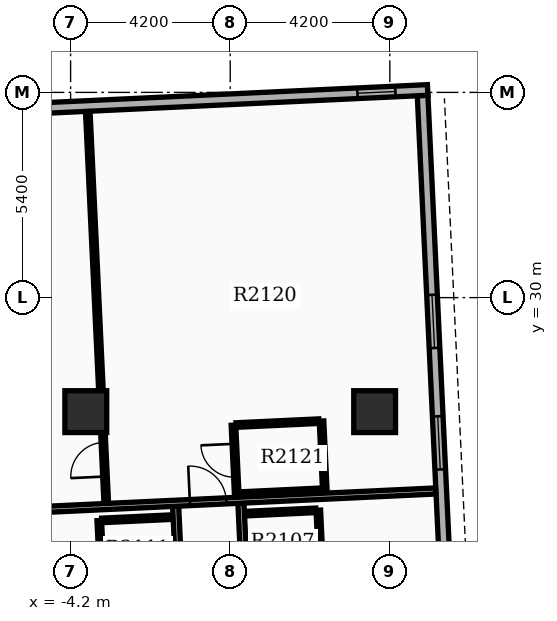
"""IFC4 building model, lengths in metres.
Left out: names, types, materials, properties, quantities, classifications, styles, units other than length and angle.
Written with IfcOpenShell. Run it as: python <this file> out.ifc"""

import sys

from ifc_helpers import new_model, si_unit, direction, frame, frame_2d, origin, origin_2d, place, context, subcontext, project, spatial, rectangle, extrude, element, fill, save


model = new_model("IFC4")
c1 = context("Model", 3, precision=1e-05, world=origin(), true_north=direction((0.0, 1.0)))
c2 = subcontext(c1, "Body", "Model", "MODEL_VIEW")
j1 = project(units=[si_unit("LENGTHUNIT", "METRE"), si_unit("PLANEANGLEUNIT", "RADIAN")], contexts=[c1])
p1 = place(None, origin())
s1 = spatial("IfcSite", under=j1, at=p1, CompositionType="ELEMENT")
p2 = place(p1, origin())
s2 = spatial("IfcBuilding", under=s1, at=p2, CompositionType="ELEMENT")
p3 = place(p2, frame((0.0, 0.0, 132.0)))
s3 = spatial("IfcBuildingStorey", under=s2, at=p3, CompositionType="ELEMENT", Elevation=132.0)
for number, where, z_axis, x_axis in (
    (1, (-3.8, 27.0, 0.0), (0.0, 0.0, 1.0), (1.0, 0.0, 0.0)),
    (2, (3.8, 27.0, 0.0), (0.0, 0.0, 1.0), (1.0, 0.0, 0.0)),
):
    element("IfcColumn", number, at=place(p3, frame(where, z_axis=z_axis, x_axis=x_axis)), inside=s3, PredefinedType="COLUMN", context=c2, shape_type="SweptSolid", body=[
        extrude(rectangle(XDim=1.1, YDim=1.1, at=origin_2d()), origin(), (0.0, 0.0, 1.0), 3.9),
    ])
p4 = place(p3, frame((6.009, 15.24, 0.0), z_axis=(0.0, 0.0, 1.0), x_axis=(-0.047103473814, 0.998890015344, 0.0)))
e3 = element("IfcWall", 3, at=p4, inside=s3, PredefinedType="STANDARD", context=c2, shape_type="SweptSolid", body=[
    extrude(rectangle(XDim=20.1, YDim=0.28, at=frame_2d((10.05, 0.0))), origin(), (0.0, 0.0, 1.0), 2.97),
])
p5 = place(p4, frame((1.6, 0.0, 0.8)))
e4 = element("IfcOpeningElement", 4, at=p5, cuts=e3, PredefinedType="OPENING", context=c2, shape_type="SweptSolid", body=[
    extrude(rectangle(XDim=1.4, YDim=1.6, at=frame_2d((0.7, 0.8))), frame((0.0, 0.15, 0.0), z_axis=(0.0, -1.0, 0.0), x_axis=(1.0, 0.0, 0.0)), (0.0, 0.0, 1.0), 0.3),
])
p6 = place(p4, frame((6.55, 0.0, 0.8)))
e5 = element("IfcOpeningElement", 5, at=p6, cuts=e3, PredefinedType="OPENING", context=c2, shape_type="SweptSolid", body=[
    extrude(rectangle(XDim=1.4, YDim=1.6, at=frame_2d((0.7, 0.8))), frame((0.0, 0.15, 0.0), z_axis=(0.0, -1.0, 0.0), x_axis=(1.0, 0.0, 0.0)), (0.0, 0.0, 1.0), 0.3),
])
p7 = place(p4, frame((10.25, 0.0, 0.8)))
e6 = element("IfcOpeningElement", 6, at=p7, cuts=e3, PredefinedType="OPENING", context=c2, shape_type="SweptSolid", body=[
    extrude(rectangle(XDim=1.4, YDim=1.6, at=frame_2d((0.7, 0.8))), frame((0.0, 0.15, 0.0), z_axis=(0.0, -1.0, 0.0), x_axis=(1.0, 0.0, 0.0)), (0.0, 0.0, 1.0), 0.3),
])
p8 = place(p4, frame((13.45, 0.0, 0.8)))
e7 = element("IfcOpeningElement", 7, at=p8, cuts=e3, PredefinedType="OPENING", context=c2, shape_type="SweptSolid", body=[
    extrude(rectangle(XDim=1.4, YDim=1.6, at=frame_2d((0.7, 0.8))), frame((0.0, 0.15, 0.0), z_axis=(0.0, -1.0, 0.0), x_axis=(1.0, 0.0, 0.0)), (0.0, 0.0, 1.0), 0.3),
])
p9 = place(p3, frame((5.195, 35.464, 0.0), z_axis=(0.0, 0.0, 1.0), x_axis=(-0.998890092147, -0.047101845086, 0.0)))
e8 = element("IfcWall", 8, at=p9, inside=s3, PredefinedType="STANDARD", context=c2, shape_type="SweptSolid", body=[
    extrude(rectangle(XDim=13.72, YDim=0.28, at=frame_2d((6.86, 0.0))), origin(), (0.0, 0.0, 1.0), 2.97),
])
p10 = place(p9, frame((0.85, 0.0, 0.85)))
e9 = element("IfcOpeningElement", 9, at=p10, cuts=e8, PredefinedType="OPENING", context=c2, shape_type="SweptSolid", body=[
    extrude(rectangle(XDim=1.0, YDim=1.5, at=frame_2d((0.5, 0.75))), frame((0.0, 0.15, 0.0), z_axis=(0.0, -1.0, 0.0), x_axis=(1.0, 0.0, 0.0)), (0.0, 0.0, 1.0), 0.3),
])
p11 = place(p3, frame((0.739, 14.901, 0.0), z_axis=(0.0, 0.0, 1.0), x_axis=(-0.047116711769, 0.99888939101, 0.0)))
e10 = element("IfcWall", 10, at=p11, inside=s3, PredefinedType="PARTITIONING", context=c2, shape_type="SweptSolid", body=[
    extrude(rectangle(XDim=9.7, YDim=0.16, at=frame_2d((4.85, 0.0))), origin(), (0.0, 0.0, 1.0), 2.96),
])
p12 = place(p11, frame((2.575, 0.0, 0.0)))
e11 = element("IfcOpeningElement", 11, at=p12, cuts=e10, PredefinedType="OPENING", context=c2, shape_type="SweptSolid", body=[
    extrude(rectangle(XDim=0.96, YDim=2.15, at=frame_2d((0.48, 1.075))), frame((0.0, 0.09, 0.0), z_axis=(0.0, -1.0, 0.0), x_axis=(1.0, 0.0, 0.0)), (0.0, 0.0, 1.0), 0.18),
])
p13 = place(p11, frame((6.467, 0.0, 0.0)))
e12 = element("IfcOpeningElement", 12, at=p13, cuts=e10, PredefinedType="OPENING", context=c2, shape_type="SweptSolid", body=[
    extrude(rectangle(XDim=0.96, YDim=2.15, at=frame_2d((0.48, 1.075))), frame((0.0, 0.09, 0.0), z_axis=(0.0, -1.0, 0.0), x_axis=(1.0, 0.0, 0.0)), (0.0, 0.0, 1.0), 0.18),
])
p14 = place(p3, frame((0.435, 24.317, 0.0), z_axis=(0.0, 0.0, 1.0), x_axis=(0.998884467853, 0.047220968666, 0.0)))
e13 = element("IfcWall", 13, at=p14, inside=s3, PredefinedType="PARTITIONING", context=c2, shape_type="SweptSolid", body=[
    extrude(rectangle(XDim=1.82, YDim=0.12, at=frame_2d((0.91, 0.0))), origin(), (0.0, 0.0, 1.0), 2.96),
])
p15 = place(p3, frame((2.393, 22.808, 0.0), z_axis=(0.0, 0.0, 1.0), x_axis=(-0.047151895633, 0.998887730798, 0.0)))
e14 = element("IfcWall", 14, at=p15, inside=s3, PredefinedType="PARTITIONING", context=c2, shape_type="SweptSolid", body=[
    extrude(rectangle(XDim=1.6, YDim=0.12, at=frame_2d((0.8, 0.0))), origin(), (0.0, 0.0, 1.0), 2.96),
])
p16 = place(p3, frame((-0.979, 14.82, 0.0), z_axis=(0.0, 0.0, 1.0), x_axis=(-0.047116711769, 0.99888939101, 0.0)))
e15 = element("IfcWall", 15, at=p16, inside=s3, PredefinedType="PARTITIONING", context=c2, shape_type="SweptSolid", body=[
    extrude(rectangle(XDim=9.7, YDim=0.16, at=frame_2d((4.85, 0.0))), origin(), (0.0, 0.0, 1.0), 2.96),
])
p17 = place(p16, frame((2.575, 0.0, 0.0)))
e16 = element("IfcOpeningElement", 16, at=p17, cuts=e15, PredefinedType="OPENING", context=c2, shape_type="SweptSolid", body=[
    extrude(rectangle(XDim=0.96, YDim=2.15, at=frame_2d((0.48, 1.075))), frame((0.0, 0.09, 0.0), z_axis=(0.0, -1.0, 0.0), x_axis=(1.0, 0.0, 0.0)), (0.0, 0.0, 1.0), 0.18),
])
p18 = place(p16, frame((6.467, 0.0, 0.0)))
e17 = element("IfcOpeningElement", 17, at=p18, cuts=e15, PredefinedType="OPENING", context=c2, shape_type="SweptSolid", body=[
    extrude(rectangle(XDim=0.96, YDim=2.15, at=frame_2d((0.48, 1.075))), frame((0.0, 0.09, 0.0), z_axis=(0.0, -1.0, 0.0), x_axis=(1.0, 0.0, 0.0)), (0.0, 0.0, 1.0), 0.18),
])
p19 = place(p3, frame((-3.381, 24.137, 0.0), z_axis=(0.0, 0.0, 1.0), x_axis=(0.998884766924, 0.047214641863, 0.0)))
e18 = element("IfcWall", 18, at=p19, inside=s3, PredefinedType="PARTITIONING", context=c2, shape_type="SweptSolid", body=[
    extrude(rectangle(XDim=1.82, YDim=0.12, at=frame_2d((0.91, 0.0))), origin(), (0.0, 0.0, 1.0), 2.96),
])
p20 = place(p3, frame((-3.37, 22.536, 0.0), z_axis=(0.0, 0.0, 1.0), x_axis=(-0.047151895633, 0.998887730798, 0.0)))
e19 = element("IfcWall", 19, at=p20, inside=s3, PredefinedType="PARTITIONING", context=c2, shape_type="SweptSolid", body=[
    extrude(rectangle(XDim=1.6, YDim=0.12, at=frame_2d((0.8, 0.0))), origin(), (0.0, 0.0, 1.0), 2.96),
])
p21 = place(p3, frame((-7.725, 24.293, 0.0), z_axis=(0.0, 0.0, 1.0), x_axis=(0.998889967692, 0.047104484326, 0.0)))
e20 = element("IfcWall", 20, at=p21, inside=s3, PredefinedType="PARTITIONING", context=c2, shape_type="SweptSolid", body=[
    extrude(rectangle(XDim=13.144, YDim=0.16, at=frame_2d((6.572, 0.0))), origin(), (0.0, 0.0, 1.0), 2.96),
])
p22 = place(p21, frame((6.672, 0.0, 0.0)))
e21 = element("IfcOpeningElement", 21, at=p22, cuts=e20, PredefinedType="OPENING", context=c2, shape_type="SweptSolid", body=[
    extrude(rectangle(XDim=0.96, YDim=2.15, at=frame_2d((0.48, 1.075))), frame((0.0, 0.09, 0.0), z_axis=(0.0, -1.0, 0.0), x_axis=(1.0, 0.0, 0.0)), (0.0, 0.0, 1.0), 0.18),
])
p23 = place(p3, frame((-3.262, 24.594, 0.0), z_axis=(0.0, 0.0, 1.0), x_axis=(-0.047089343138, 0.998890681588, 0.0)))
e22 = element("IfcWall", 22, at=p23, inside=s3, PredefinedType="PARTITIONING", context=c2, shape_type="SweptSolid", body=[
    extrude(rectangle(XDim=10.312, YDim=0.12, at=frame_2d((5.156, 0.0))), origin(), (0.0, 0.0, 1.0), 2.96),
])
p24 = place(p23, frame((0.7, 0.0, 0.0)))
e23 = element("IfcOpeningElement", 23, at=p24, cuts=e22, PredefinedType="OPENING", context=c2, shape_type="SweptSolid", body=[
    extrude(rectangle(XDim=0.9, YDim=2.1, at=frame_2d((0.45, 1.05))), frame((0.0, 0.07, 0.0), z_axis=(0.0, -1.0, 0.0), x_axis=(1.0, 0.0, 0.0)), (0.0, 0.0, 1.0), 0.14),
])
p25 = place(p3, frame((0.171, 24.826, 0.0), z_axis=(0.0, 0.0, 1.0), x_axis=(-0.047087116047, 0.998890786574, 0.0)))
e24 = element("IfcWall", 24, at=p25, inside=s3, PredefinedType="PARTITIONING", context=c2, shape_type="SweptSolid", body=[
    extrude(rectangle(XDim=1.82, YDim=0.12, at=frame_2d((0.91, 0.0))), origin(), (0.0, 0.0, 1.0), 2.96),
])
p26 = place(p25, frame((0.45, 0.0, 0.0)))
e25 = element("IfcOpeningElement", 25, at=p26, cuts=e24, PredefinedType="OPENING", context=c2, shape_type="SweptSolid", body=[
    extrude(rectangle(XDim=0.88, YDim=2.1, at=frame_2d((0.44, 1.05))), frame((0.0, 0.07, 0.0), z_axis=(0.0, -1.0, 0.0), x_axis=(1.0, 0.0, 0.0)), (0.0, 0.0, 1.0), 0.14),
])
p27 = place(p3, frame((2.488, 24.935, 0.0), z_axis=(0.0, 0.0, 1.0), x_axis=(-0.047214641863, 0.998884766924, 0.0)))
e26 = element("IfcWall", 26, at=p27, inside=s3, PredefinedType="PARTITIONING", context=c2, shape_type="SweptSolid", body=[
    extrude(rectangle(XDim=1.82, YDim=0.12, at=frame_2d((0.91, 0.0))), origin(), (0.0, 0.0, 1.0), 2.96),
])
p28 = place(p3, frame((0.241, 24.829, 0.0), z_axis=(0.0, 0.0, 1.0), x_axis=(0.998887815408, 0.047150103183, 0.0)))
e27 = element("IfcWall", 27, at=p28, inside=s3, PredefinedType="PARTITIONING", context=c2, shape_type="SweptSolid", body=[
    extrude(rectangle(XDim=2.18, YDim=0.12, at=frame_2d((1.09, 0.0))), origin(), (0.0, 0.0, 1.0), 2.96),
])
p29 = place(p3, frame((0.155, 26.647, 0.0), z_axis=(0.0, 0.0, 1.0), x_axis=(0.998893331673, 0.047033094092, 0.0)))
e28 = element("IfcWall", 28, at=p29, inside=s3, PredefinedType="PARTITIONING", context=c2, shape_type="SweptSolid", body=[
    extrude(rectangle(XDim=2.18, YDim=0.12, at=frame_2d((1.09, 0.0))), origin(), (0.0, 0.0, 1.0), 2.96),
])
p30 = place(p7, origin())
e29 = element("IfcWindow", 29, at=p30, inside=s3, PartitioningType="SINGLE_PANEL", PredefinedType="WINDOW", context=c2, shape_type="SweptSolid", body=[
    extrude(rectangle(XDim=1.4, YDim=1.6, at=frame_2d((0.7, 0.8))), frame((0.0, 0.03, 0.0), z_axis=(0.0, -1.0, 0.0), x_axis=(1.0, 0.0, 0.0)), (0.0, 0.0, 1.0), 0.06),
])
fill(e6, e29)
p31 = place(p8, origin())
e30 = element("IfcWindow", 30, at=p31, inside=s3, PartitioningType="SINGLE_PANEL", PredefinedType="WINDOW", context=c2, shape_type="SweptSolid", body=[
    extrude(rectangle(XDim=1.4, YDim=1.6, at=frame_2d((0.7, 0.8))), frame((0.0, 0.03, 0.0), z_axis=(0.0, -1.0, 0.0), x_axis=(1.0, 0.0, 0.0)), (0.0, 0.0, 1.0), 0.06),
])
fill(e7, e30)
p32 = place(p10, origin())
e31 = element("IfcWindow", 31, at=p32, inside=s3, PartitioningType="SINGLE_PANEL", PredefinedType="WINDOW", context=c2, shape_type="SweptSolid", body=[
    extrude(rectangle(XDim=1.0, YDim=1.5, at=frame_2d((0.5, 0.75))), frame((0.0, 0.03, 0.0), z_axis=(0.0, -1.0, 0.0), x_axis=(1.0, 0.0, 0.0)), (0.0, 0.0, 1.0), 0.06),
])
fill(e9, e31)
p33 = place(p22, origin())
e32 = element("IfcDoor", 32, at=p33, inside=s3, OperationType="SINGLE_SWING_LEFT", PredefinedType="DOOR", context=c2, shape_type="SweptSolid", body=[
    extrude(rectangle(XDim=0.96, YDim=2.15, at=frame_2d((0.48, 1.075))), frame((0.0, 0.025, 0.0), z_axis=(0.0, -1.0, 0.0), x_axis=(1.0, 0.0, 0.0)), (0.0, 0.0, 1.0), 0.05),
])
fill(e21, e32)
p34 = place(p24, origin())
e33 = element("IfcDoor", 33, at=p34, inside=s3, OperationType="SINGLE_SWING_LEFT", PredefinedType="DOOR", context=c2, shape_type="SweptSolid", body=[
    extrude(rectangle(XDim=0.9, YDim=2.1, at=frame_2d((0.45, 1.05))), frame((0.0, 0.025, 0.0), z_axis=(0.0, -1.0, 0.0), x_axis=(1.0, 0.0, 0.0)), (0.0, 0.0, 1.0), 0.05),
])
fill(e23, e33)
p35 = place(p26, origin())
e34 = element("IfcDoor", 34, at=p35, inside=s3, OperationType="SINGLE_SWING_RIGHT", PredefinedType="DOOR", context=c2, shape_type="SweptSolid", body=[
    extrude(rectangle(XDim=0.88, YDim=2.1, at=frame_2d((0.44, 1.05))), frame((0.0, 0.025, 0.0), z_axis=(0.0, -1.0, 0.0), x_axis=(1.0, 0.0, 0.0)), (0.0, 0.0, 1.0), 0.05),
])
fill(e25, e34)
save(model, sys.argv[1])
